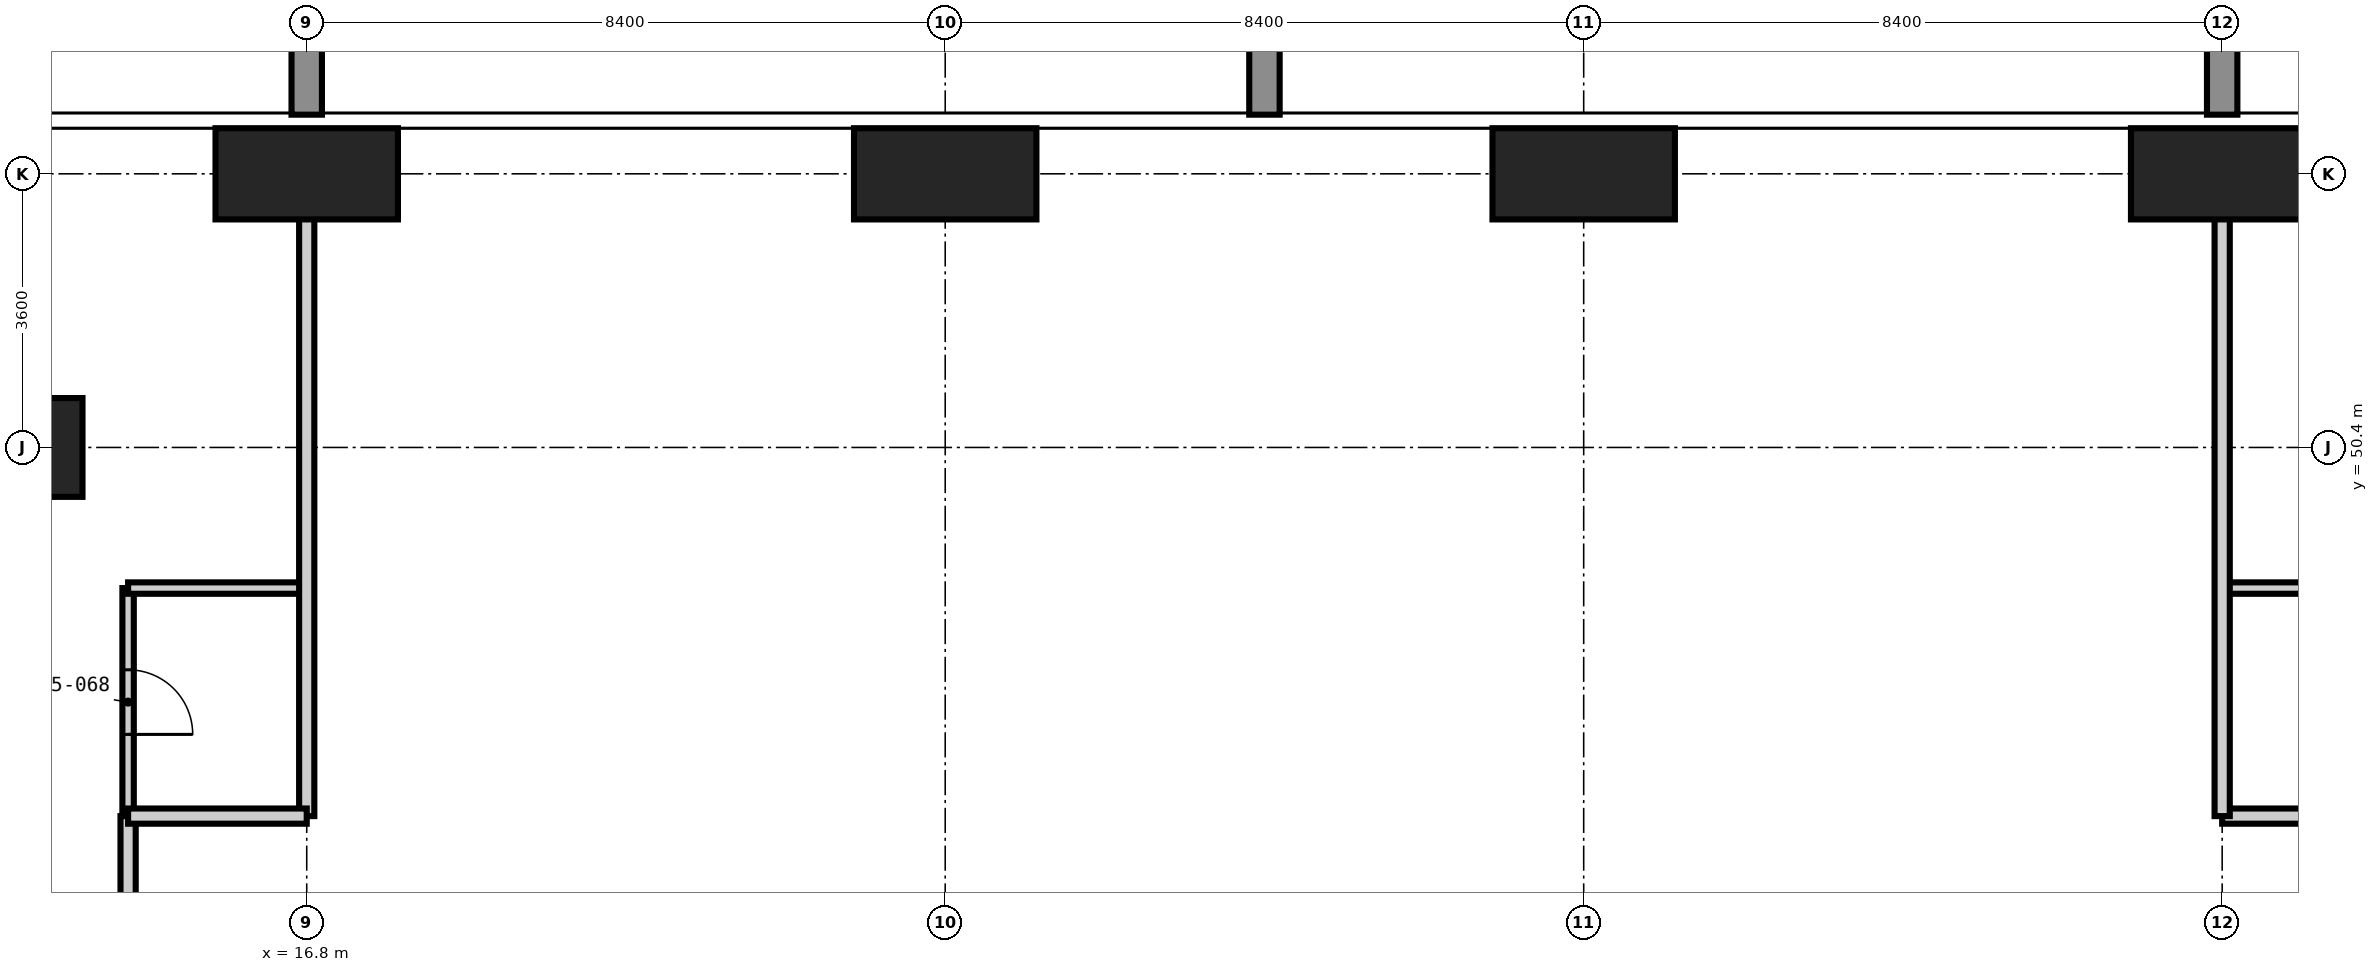
"""IFC4 building model, lengths in metres.
Left out: names, types, materials, properties, quantities, classifications, styles, units other than length and angle.
Written with IfcOpenShell. Run it as: python <this file> out.ifc"""

import sys

from ifc_helpers import new_model, si_unit, direction, frame, frame_2d, origin, origin_2d, place, context, subcontext, project, spatial, rectangle, extrude, element, fill, save


model = new_model("IFC4")
c1 = context("Model", 3, precision=1e-05, world=origin(), true_north=direction((0.0, 1.0)))
c2 = subcontext(c1, "Body", "Model", "MODEL_VIEW")
j1 = project(units=[si_unit("LENGTHUNIT", "METRE"), si_unit("PLANEANGLEUNIT", "RADIAN")], contexts=[c1])
p1 = place(None, origin())
s1 = spatial("IfcSite", under=j1, at=p1, CompositionType="ELEMENT")
p2 = place(p1, origin())
s2 = spatial("IfcBuilding", under=s1, at=p2, CompositionType="ELEMENT")
p3 = place(p2, frame((0.0, 0.0, 177.0)))
s3 = spatial("IfcBuildingStorey", under=s2, at=p3, CompositionType="ELEMENT", Elevation=177.0)
p4 = place(p3, frame((13.2, 50.4, -0.35), z_axis=(0.0, 0.0, 1.0), x_axis=(1.0, 0.0, 0.0)))
e1 = element("IfcColumn", 1, at=p4, inside=s3, PredefinedType="COLUMN", context=c2, shape_type="SweptSolid", body=[
    extrude(rectangle(XDim=1.3, YDim=1.3, at=origin_2d()), origin(), (0.0, 0.0, 1.0), 3.6),
])
for number, where, z_axis, x_axis in (
    (2, (16.8, 54.0, -0.35), (0.0, 0.0, 1.0), (1.0, 0.0, 0.0)),
    (3, (25.2, 54.0, -0.35), (0.0, 0.0, 1.0), (1.0, 0.0, 0.0)),
    (4, (33.6, 54.0, -0.35), (0.0, 0.0, 1.0), (1.0, 0.0, 0.0)),
    (5, (42.0, 54.0, -0.35), (0.0, 0.0, 1.0), (1.0, 0.0, 0.0)),
):
    element("IfcColumn", number, at=place(p3, frame(where, z_axis=z_axis, x_axis=x_axis)), inside=s3, PredefinedType="COLUMN", context=c2, shape_type="SweptSolid", body=[
        extrude(rectangle(XDim=2.4, YDim=1.2, at=origin_2d()), origin(), (0.0, 0.0, 1.0), 3.6),
    ])
p5 = place(p3, frame((14.45, 45.55, 0.0), z_axis=(0.0, 0.0, 1.0), x_axis=(0.0, 1.0, 0.0)))
e6 = element("IfcWall", 6, at=p5, inside=s3, PredefinedType="PARTITIONING", context=c2, shape_type="SweptSolid", body=[
    extrude(rectangle(XDim=3.0, YDim=0.15, at=frame_2d((1.5, 0.0))), origin(), (0.0, 0.0, 1.0), 3.25),
])
p6 = place(p5, frame((1.075, 0.0, 0.0)))
e7 = element("IfcOpeningElement", 7, at=p6, cuts=e6, PredefinedType="OPENING", context=c2, shape_type="SweptSolid", body=[
    extrude(rectangle(XDim=0.85, YDim=2.1, at=frame_2d((0.425, 1.05))), frame((0.0, 0.085, 0.0), z_axis=(0.0, -1.0, 0.0), x_axis=(1.0, 0.0, 0.0)), (0.0, 0.0, 1.0), 0.17),
])
p7 = place(p3, frame((14.45, 48.55, 0.0), z_axis=(0.0, 0.0, 1.0), x_axis=(1.0, 0.0, 0.0)))
e8 = element("IfcWall", 8, at=p7, inside=s3, PredefinedType="PARTITIONING", context=c2, shape_type="SweptSolid", body=[
    extrude(rectangle(XDim=2.35, YDim=0.15, at=frame_2d((1.175, 0.0))), origin(), (0.0, 0.0, 1.0), 3.25),
])
p8 = place(p3, frame((42.0, 48.55, 0.0), z_axis=(0.0, 0.0, 1.0), x_axis=(1.0, 0.0, 0.0)))
e9 = element("IfcWall", 9, at=p8, inside=s3, PredefinedType="PARTITIONING", context=c2, shape_type="SweptSolid", body=[
    extrude(rectangle(XDim=2.95, YDim=0.15, at=frame_2d((1.475, 0.0))), origin(), (0.0, 0.0, 1.0), 3.25),
])
p9 = place(p3, frame((14.45, 14.45, 0.0), z_axis=(0.0, 0.0, 1.0), x_axis=(0.0, 1.0, 0.0)))
e10 = element("IfcWall", 10, at=p9, inside=s3, PredefinedType="PARTITIONING", context=c2, shape_type="SweptSolid", body=[
    extrude(rectangle(XDim=31.1, YDim=0.2, at=frame_2d((15.55, 0.0))), origin(), (0.0, 0.0, 1.0), 3.25),
])
p10 = place(p9, frame((6.05, 0.0, 0.0)))
e11 = element("IfcOpeningElement", 11, at=p10, cuts=e10, PredefinedType="OPENING", context=c2, shape_type="SweptSolid", body=[
    extrude(rectangle(XDim=1.0, YDim=2.2, at=frame_2d((0.5, 1.1))), frame((0.0, 0.11, 0.0), z_axis=(0.0, -1.0, 0.0), x_axis=(1.0, 0.0, 0.0)), (0.0, 0.0, 1.0), 0.22),
])
p11 = place(p9, frame((11.95, 0.0, 0.0)))
e12 = element("IfcOpeningElement", 12, at=p11, cuts=e10, PredefinedType="OPENING", context=c2, shape_type="SweptSolid", body=[
    extrude(rectangle(XDim=1.8, YDim=2.4, at=frame_2d((0.9, 1.2))), frame((0.0, 0.11, 0.0), z_axis=(0.0, -1.0, 0.0), x_axis=(1.0, 0.0, 0.0)), (0.0, 0.0, 1.0), 0.22),
])
p12 = place(p9, frame((19.575, 0.0, 0.0)))
e13 = element("IfcOpeningElement", 13, at=p12, cuts=e10, PredefinedType="OPENING", context=c2, shape_type="SweptSolid", body=[
    extrude(rectangle(XDim=1.0, YDim=2.2, at=frame_2d((0.5, 1.1))), frame((0.0, 0.11, 0.0), z_axis=(0.0, -1.0, 0.0), x_axis=(1.0, 0.0, 0.0)), (0.0, 0.0, 1.0), 0.22),
])
p13 = place(p9, frame((24.95, 0.0, 0.0)))
e14 = element("IfcOpeningElement", 14, at=p13, cuts=e10, PredefinedType="OPENING", context=c2, shape_type="SweptSolid", body=[
    extrude(rectangle(XDim=1.0, YDim=2.2, at=frame_2d((0.5, 1.1))), frame((0.0, 0.11, 0.0), z_axis=(0.0, -1.0, 0.0), x_axis=(1.0, 0.0, 0.0)), (0.0, 0.0, 1.0), 0.22),
])
p14 = place(p9, frame((0.675, 0.0, 0.0)))
e15 = element("IfcOpeningElement", 15, at=p14, cuts=e10, PredefinedType="OPENING", context=c2, shape_type="SweptSolid", body=[
    extrude(rectangle(XDim=1.0, YDim=2.2, at=frame_2d((0.5, 1.1))), frame((0.0, 0.11, 0.0), z_axis=(0.0, -1.0, 0.0), x_axis=(1.0, 0.0, 0.0)), (0.0, 0.0, 1.0), 0.22),
])
p15 = place(p9, frame((28.825, 0.0, 0.0)))
e16 = element("IfcOpeningElement", 16, at=p15, cuts=e10, PredefinedType="OPENING", context=c2, shape_type="SweptSolid", body=[
    extrude(rectangle(XDim=1.0, YDim=2.2, at=frame_2d((0.5, 1.1))), frame((0.0, 0.11, 0.0), z_axis=(0.0, -1.0, 0.0), x_axis=(1.0, 0.0, 0.0)), (0.0, 0.0, 1.0), 0.22),
])
p16 = place(p3, frame((16.8, 45.55, 0.0), z_axis=(0.0, 0.0, 1.0), x_axis=(0.0, 1.0, 0.0)))
e17 = element("IfcWall", 17, at=p16, inside=s3, PredefinedType="PARTITIONING", context=c2, shape_type="SweptSolid", body=[
    extrude(rectangle(XDim=9.068, YDim=0.2, at=frame_2d((4.534, 0.0))), origin(), (0.0, 0.0, 1.0), 3.25),
])
p17 = place(p3, frame((14.45, 45.55, 0.0), z_axis=(0.0, 0.0, 1.0), x_axis=(1.0, 0.0, 0.0)))
e18 = element("IfcWall", 18, at=p17, inside=s3, PredefinedType="PARTITIONING", context=c2, shape_type="SweptSolid", body=[
    extrude(rectangle(XDim=2.35, YDim=0.2, at=frame_2d((1.175, 0.0))), origin(), (0.0, 0.0, 1.0), 3.25),
])
p18 = place(p3, frame((42.0, 45.55, 0.0), z_axis=(0.0, 0.0, 1.0), x_axis=(1.0, 0.0, 0.0)))
e19 = element("IfcWall", 19, at=p18, inside=s3, PredefinedType="PARTITIONING", context=c2, shape_type="SweptSolid", body=[
    extrude(rectangle(XDim=2.95, YDim=0.2, at=frame_2d((1.475, 0.0))), origin(), (0.0, 0.0, 1.0), 3.25),
])
p19 = place(p3, frame((42.0, 54.618, 0.0), z_axis=(0.0, 0.0, 1.0), x_axis=(0.0, -1.0, 0.0)))
e20 = element("IfcWall", 20, at=p19, inside=s3, PredefinedType="PARTITIONING", context=c2, shape_type="SweptSolid", body=[
    extrude(rectangle(XDim=9.068, YDim=0.2, at=frame_2d((4.534, 0.0))), origin(), (0.0, 0.0, 1.0), 3.25),
])
p20 = place(p6, frame((0.85, 0.0, 0.0), z_axis=(0.0, 0.0, 1.0), x_axis=(-1.0, 0.0, 0.0)))
e21 = element("IfcDoor", 21, at=p20, inside=s3, OperationType="SINGLE_SWING_RIGHT", PredefinedType="DOOR", context=c2, shape_type="SweptSolid", body=[
    extrude(rectangle(XDim=0.85, YDim=2.1, at=frame_2d((0.425, 1.05))), frame((0.0, 0.025, 0.0), z_axis=(0.0, -1.0, 0.0), x_axis=(1.0, 0.0, 0.0)), (0.0, 0.0, 1.0), 0.05),
])
fill(e7, e21)
save(model, sys.argv[1])
